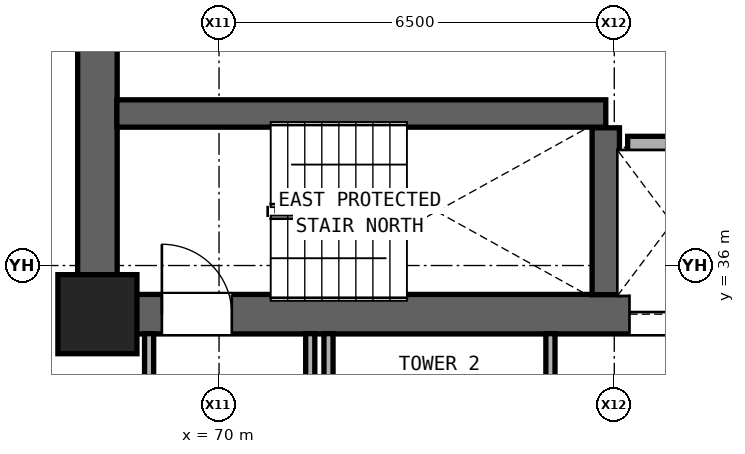
"""IFC4 building model, lengths in metres.
Left out: names, types, materials, properties, quantities, classifications, styles, units other than length and angle.
Written with IfcOpenShell. Run it as: python <this file> out.ifc"""

import sys

from ifc_helpers import new_model, si_unit, direction, frame, frame_2d, origin, origin_2d, place, context, subcontext, project, spatial, rectangle, extrude, element, fill, save


model = new_model("IFC4")
c1 = context("Model", 3, precision=1e-05, world=origin(), true_north=direction((0.0, 1.0)))
c2 = subcontext(c1, "Body", "Model", "MODEL_VIEW")
j1 = project(units=[si_unit("LENGTHUNIT", "METRE"), si_unit("PLANEANGLEUNIT", "RADIAN")], contexts=[c1])
p1 = place(None, origin())
s1 = spatial("IfcSite", under=j1, at=p1, CompositionType="ELEMENT")
p2 = place(p1, origin())
s2 = spatial("IfcBuilding", under=s1, at=p2, CompositionType="ELEMENT")
p3 = place(p2, frame((0.0, 0.0, 68.6)))
s3 = spatial("IfcBuildingStorey", under=s2, at=p3, CompositionType="ELEMENT", Elevation=68.6)
p4 = place(p3, frame((68.0, 35.2, 0.0), z_axis=(0.0, 0.0, 1.0), x_axis=(1.0, 0.0, 0.0)))
e1 = element("IfcColumn", 1, at=p4, inside=s3, PredefinedType="COLUMN", context=c2, shape_type="SweptSolid", body=[
    extrude(rectangle(XDim=1.3, YDim=1.3, at=origin_2d()), origin(), (0.0, 0.0, 1.0), 3.3),
])
p5 = place(p3, frame((68.0, 35.2, 0.0), z_axis=(0.0, 0.0, 1.0), x_axis=(0.0, 1.0, 0.0)))
e2 = element("IfcWall", 2, at=p5, inside=s3, PredefinedType="SHEAR", context=c2, shape_type="SweptSolid", body=[
    extrude(rectangle(XDim=5.6, YDim=0.65, at=frame_2d((2.8, 0.0))), origin(), (0.0, 0.0, 1.0), 3.06),
])
p6 = place(p3, frame((68.0, 35.2, 0.0), z_axis=(0.0, 0.0, 1.0), x_axis=(1.0, 0.0, 0.0)))
e3 = element("IfcWall", 3, at=p6, inside=s3, PredefinedType="SHEAR", context=c2, shape_type="SweptSolid", body=[
    extrude(rectangle(XDim=17.0, YDim=0.65, at=frame_2d((8.5, 0.0))), origin(), (0.0, 0.0, 1.0), 3.06),
])
p7 = place(p6, frame((1.06, 0.0, 0.0)))
e4 = element("IfcOpeningElement", 4, at=p7, cuts=e3, PredefinedType="OPENING", context=c2, shape_type="SweptSolid", body=[
    extrude(rectangle(XDim=1.15, YDim=2.2, at=frame_2d((0.575, 1.1))), frame((0.0, 0.335, 0.0), z_axis=(0.0, -1.0, 0.0), x_axis=(1.0, 0.0, 0.0)), (0.0, 0.0, 1.0), 0.67),
])
p8 = place(p6, frame((8.75, 0.0, 0.0)))
e5 = element("IfcOpeningElement", 5, at=p8, cuts=e3, PredefinedType="OPENING", context=c2, shape_type="SweptSolid", body=[
    extrude(rectangle(XDim=1.4, YDim=2.35, at=frame_2d((0.7, 1.175))), frame((0.0, 0.335, 0.0), z_axis=(0.0, -1.0, 0.0), x_axis=(1.0, 0.0, 0.0)), (0.0, 0.0, 1.0), 0.67),
])
p9 = place(p6, frame((10.77, 0.0, 0.0)))
e6 = element("IfcOpeningElement", 6, at=p9, cuts=e3, PredefinedType="OPENING", context=c2, shape_type="SweptSolid", body=[
    extrude(rectangle(XDim=1.3, YDim=2.3, at=frame_2d((0.65, 1.15))), frame((0.0, 0.335, 0.0), z_axis=(0.0, -1.0, 0.0), x_axis=(1.0, 0.0, 0.0)), (0.0, 0.0, 1.0), 0.67),
])
p10 = place(p6, frame((12.69, 0.0, 0.0)))
e7 = element("IfcOpeningElement", 7, at=p10, cuts=e3, PredefinedType="OPENING", context=c2, shape_type="SweptSolid", body=[
    extrude(rectangle(XDim=1.3, YDim=2.3, at=frame_2d((0.65, 1.15))), frame((0.0, 0.335, 0.0), z_axis=(0.0, -1.0, 0.0), x_axis=(1.0, 0.0, 0.0)), (0.0, 0.0, 1.0), 0.67),
])
p11 = place(p6, frame((14.57, 0.0, 0.0)))
e8 = element("IfcOpeningElement", 8, at=p11, cuts=e3, PredefinedType="OPENING", context=c2, shape_type="SweptSolid", body=[
    extrude(rectangle(XDim=1.3, YDim=2.3, at=frame_2d((0.65, 1.15))), frame((0.0, 0.335, 0.0), z_axis=(0.0, -1.0, 0.0), x_axis=(1.0, 0.0, 0.0)), (0.0, 0.0, 1.0), 0.67),
])
p12 = place(p3, frame((76.72, 38.0, 0.0), z_axis=(0.0, 0.0, 1.0), x_axis=(1.0, 0.0, 0.0)))
e9 = element("IfcWall", 9, at=p12, inside=s3, PredefinedType="SOLIDWALL", context=c2, shape_type="SweptSolid", body=[
    extrude(rectangle(XDim=3.66, YDim=0.25, at=frame_2d((1.83, 0.0))), origin(), (0.0, 0.0, 1.0), 3.06),
])
p13 = place(p3, frame((68.32, 38.5, 0.0), z_axis=(0.0, 0.0, 1.0), x_axis=(1.0, 0.0, 0.0)))
e10 = element("IfcWall", 10, at=p13, inside=s3, PredefinedType="SHEAR", context=c2, shape_type="SweptSolid", body=[
    extrude(rectangle(XDim=8.04, YDim=0.45, at=frame_2d((4.02, 0.0))), origin(), (0.0, 0.0, 1.0), 3.06),
])
p14 = place(p3, frame((68.85, 32.135, 0.0), z_axis=(0.0, 0.0, 1.0), x_axis=(0.0, 1.0, 0.0)))
e11 = element("IfcWall", 11, at=p14, inside=s3, PredefinedType="PARTITIONING", context=c2, shape_type="SweptSolid", body=[
    extrude(rectangle(XDim=2.745, YDim=0.15, at=frame_2d((1.373, 0.0))), origin(), (0.0, 0.0, 1.0), 3.06),
])
for number, where, z_axis, x_axis in (
    (12, (71.5, 32.17, 0.0), (0.0, 0.0, 1.0), (0.0, 1.0, 0.0)),
    (13, (71.8, 32.17, 0.0), (0.0, 0.0, 1.0), (0.0, 1.0, 0.0)),
    (14, (75.45, 32.17, 0.0), (0.0, 0.0, 1.0), (0.0, 1.0, 0.0)),
):
    element("IfcWall", number, at=place(p3, frame(where, z_axis=z_axis, x_axis=x_axis)), inside=s3, PredefinedType="PARTITIONING", context=c2, shape_type="SweptSolid", body=[
        extrude(rectangle(XDim=2.71, YDim=0.15, at=frame_2d((1.355, 0.0))), origin(), (0.0, 0.0, 1.0), 3.06),
    ])
p15 = place(p3, frame((76.36, 35.52, 0.0), z_axis=(0.0, 0.0, 1.0), x_axis=(0.0, 1.0, 0.0)))
e15 = element("IfcWall", 15, at=p15, inside=s3, PredefinedType="SHEAR", context=c2, shape_type="SweptSolid", body=[
    extrude(rectangle(XDim=2.745, YDim=0.45, at=frame_2d((1.373, 0.0))), origin(), (0.0, 0.0, 1.0), 3.06),
])
p16 = place(p7, origin())
e16 = element("IfcDoor", 16, at=p16, inside=s3, OperationType="SINGLE_SWING_LEFT", PredefinedType="DOOR", context=c2, shape_type="SweptSolid", body=[
    extrude(rectangle(XDim=1.15, YDim=2.2, at=frame_2d((0.575, 1.1))), frame((0.0, 0.025, 0.0), z_axis=(0.0, -1.0, 0.0), x_axis=(1.0, 0.0, 0.0)), (0.0, 0.0, 1.0), 0.05),
])
fill(e4, e16)
p17 = place(p8, origin())
e17 = element("IfcDoor", 17, at=p17, inside=s3, OperationType="DOUBLE_DOOR_SLIDING", PredefinedType="DOOR", context=c2, shape_type="SweptSolid", body=[
    extrude(rectangle(XDim=1.4, YDim=2.35, at=frame_2d((0.7, 1.175))), frame((0.0, 0.025, 0.0), z_axis=(0.0, -1.0, 0.0), x_axis=(1.0, 0.0, 0.0)), (0.0, 0.0, 1.0), 0.05),
])
fill(e5, e17)
save(model, sys.argv[1])
